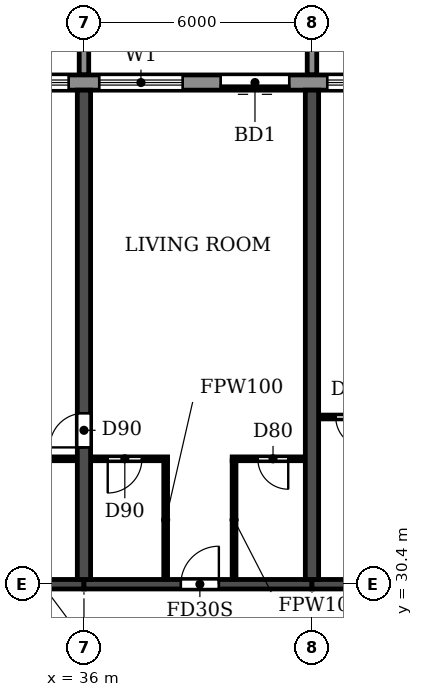
"""IFC4 building model, lengths in metres.
Left out: names, types, materials, properties, quantities, classifications, styles, units other than length and angle.
Written with IfcOpenShell. Run it as: python <this file> out.ifc"""

import sys

from ifc_helpers import new_model, si_unit, direction, frame, frame_2d, origin, place, context, subcontext, project, spatial, polyline, rectangle, outline, extrude, source, transform, mapped, element, fill, save


model = new_model("IFC4")
c1 = context("Model", 3, precision=1e-05, world=origin(), true_north=direction((0.0, 1.0)))
c2 = subcontext(c1, "Body", "Model", "MODEL_VIEW")
j1 = project(units=[si_unit("LENGTHUNIT", "METRE"), si_unit("PLANEANGLEUNIT", "RADIAN")], contexts=[c1])
p1 = place(None, origin())
s1 = spatial("IfcSite", under=j1, at=p1, CompositionType="ELEMENT")
p2 = place(p1, origin())
s2 = spatial("IfcBuilding", under=s1, at=p2, CompositionType="ELEMENT")
p3 = place(p2, frame((0.0, 0.0, 102.6)))
s3 = spatial("IfcBuildingStorey", under=s2, at=p3, CompositionType="ELEMENT", Elevation=102.6)
p4 = place(p3, frame((36.0, 30.525, 0.0), z_axis=(0.0, 0.0, 1.0), x_axis=(0.0, 1.0, 0.0)))
e1 = element("IfcWall", 1, at=p4, inside=s3, PredefinedType="SHEAR", context=c2, shape_type="SweptSolid", body=[
    extrude(rectangle(XDim=12.875, YDim=0.35, at=frame_2d((6.438, 0.0))), origin(), (0.0, 0.0, 1.0), 3.0),
])
p5 = place(p4, frame((3.475, 0.0, 0.0)))
e2 = element("IfcOpeningElement", 2, at=p5, cuts=e1, PredefinedType="OPENING", context=c2, shape_type="SweptSolid", body=[
    extrude(rectangle(XDim=0.9, YDim=2.1, at=frame_2d((0.45, 1.05))), frame((0.0, 0.185, 0.0), z_axis=(0.0, -1.0, 0.0), x_axis=(1.0, 0.0, 0.0)), (0.0, 0.0, 1.0), 0.37),
])
p6 = place(p3, frame((42.0, 30.525, 0.0), z_axis=(0.0, 0.0, 1.0), x_axis=(0.0, 1.0, 0.0)))
e3 = element("IfcWall", 3, at=p6, inside=s3, PredefinedType="SHEAR", context=c2, shape_type="SweptSolid", body=[
    extrude(rectangle(XDim=12.875, YDim=0.35, at=frame_2d((6.438, 0.0))), origin(), (0.0, 0.0, 1.0), 3.0),
])
p7 = place(p3, frame((30.0, 30.4, 0.0), z_axis=(0.0, 0.0, 1.0), x_axis=(1.0, 0.0, 0.0)))
e4 = element("IfcWall", 4, at=p7, inside=s3, PredefinedType="SHEAR", context=c2, shape_type="SweptSolid", body=[
    extrude(rectangle(XDim=6.0, YDim=0.25, at=frame_2d((3.0, 0.0))), origin(), (0.0, 0.0, 1.0), 2.4),
])
p8 = place(p3, frame((36.0, 30.4, 0.0), z_axis=(0.0, 0.0, 1.0), x_axis=(1.0, 0.0, 0.0)))
e5 = element("IfcWall", 5, at=p8, inside=s3, PredefinedType="SHEAR", context=c2, shape_type="SweptSolid", body=[
    extrude(rectangle(XDim=6.0, YDim=0.25, at=frame_2d((3.0, 0.0))), origin(), (0.0, 0.0, 1.0), 2.4),
])
p9 = place(p8, frame((2.55, 0.0, 0.0)))
e6 = element("IfcOpeningElement", 6, at=p9, cuts=e5, PredefinedType="OPENING", context=c2, shape_type="SweptSolid", body=[
    extrude(rectangle(XDim=1.0, YDim=2.1, at=frame_2d((0.5, 1.05))), frame((0.0, 0.135, 0.0), z_axis=(0.0, -1.0, 0.0), x_axis=(1.0, 0.0, 0.0)), (0.0, 0.0, 1.0), 0.27),
])
p10 = place(p3, frame((42.0, 30.4, 0.0), z_axis=(0.0, 0.0, 1.0), x_axis=(1.0, 0.0, 0.0)))
e7 = element("IfcWall", 7, at=p10, inside=s3, PredefinedType="SHEAR", context=c2, shape_type="SweptSolid", body=[
    extrude(rectangle(XDim=6.0, YDim=0.25, at=frame_2d((3.0, 0.0))), origin(), (0.0, 0.0, 1.0), 2.4),
])
p11 = place(p10, frame((2.45, 0.0, 0.0)))
e8 = element("IfcOpeningElement", 8, at=p11, cuts=e7, PredefinedType="OPENING", context=c2, shape_type="SweptSolid", body=[
    extrude(rectangle(XDim=1.0, YDim=2.1, at=frame_2d((0.5, 1.05))), frame((0.0, 0.135, 0.0), z_axis=(0.0, -1.0, 0.0), x_axis=(1.0, 0.0, 0.0)), (0.0, 0.0, 1.0), 0.27),
])
p12 = place(p3, frame((91.317, 43.6, 0.0), z_axis=(0.0, 0.0, 1.0), x_axis=(-1.0, 0.0, 0.0)))
e9 = element("IfcWall", 9, at=p12, inside=s3, PredefinedType="STANDARD", context=c2, shape_type="SweptSolid", body=[
    extrude(rectangle(XDim=80.634, YDim=0.4, at=frame_2d((40.317, 0.0))), origin(), (0.0, 0.0, 1.0), 3.0),
])
p13 = place(p12, frame((76.717, 0.0, 0.9)))
e10 = element("IfcOpeningElement", 10, at=p13, cuts=e9, PredefinedType="OPENING", context=c2, shape_type="SweptSolid", body=[
    extrude(rectangle(XDim=2.2, YDim=1.5, at=frame_2d((1.1, 0.75))), frame((0.0, 0.21, 0.0), z_axis=(0.0, -1.0, 0.0), x_axis=(1.0, 0.0, 0.0)), (0.0, 0.0, 1.0), 0.42),
])
p14 = place(p12, frame((73.917, 0.0, 0.0)))
e11 = element("IfcOpeningElement", 11, at=p14, cuts=e9, PredefinedType="OPENING", context=c2, shape_type="SweptSolid", body=[
    extrude(rectangle(XDim=1.8, YDim=2.4, at=frame_2d((0.9, 1.2))), frame((0.0, 0.21, 0.0), z_axis=(0.0, -1.0, 0.0), x_axis=(1.0, 0.0, 0.0)), (0.0, 0.0, 1.0), 0.42),
])
p15 = place(p12, frame((70.717, 0.0, 0.9)))
e12 = element("IfcOpeningElement", 12, at=p15, cuts=e9, PredefinedType="OPENING", context=c2, shape_type="SweptSolid", body=[
    extrude(rectangle(XDim=2.2, YDim=1.5, at=frame_2d((1.1, 0.75))), frame((0.0, 0.21, 0.0), z_axis=(0.0, -1.0, 0.0), x_axis=(1.0, 0.0, 0.0)), (0.0, 0.0, 1.0), 0.42),
])
p16 = place(p12, frame((67.717, 0.0, 0.9)))
e13 = element("IfcOpeningElement", 13, at=p16, cuts=e9, PredefinedType="OPENING", context=c2, shape_type="SweptSolid", body=[
    extrude(rectangle(XDim=2.2, YDim=1.5, at=frame_2d((1.1, 0.75))), frame((0.0, 0.21, 0.0), z_axis=(0.0, -1.0, 0.0), x_axis=(1.0, 0.0, 0.0)), (0.0, 0.0, 1.0), 0.42),
])
p17 = place(p12, frame((64.917, 0.0, 0.0)))
e14 = element("IfcOpeningElement", 14, at=p17, cuts=e9, PredefinedType="OPENING", context=c2, shape_type="SweptSolid", body=[
    extrude(rectangle(XDim=1.8, YDim=2.4, at=frame_2d((0.9, 1.2))), frame((0.0, 0.21, 0.0), z_axis=(0.0, -1.0, 0.0), x_axis=(1.0, 0.0, 0.0)), (0.0, 0.0, 1.0), 0.42),
])
p18 = place(p12, frame((61.717, 0.0, 0.9)))
e15 = element("IfcOpeningElement", 15, at=p18, cuts=e9, PredefinedType="OPENING", context=c2, shape_type="SweptSolid", body=[
    extrude(rectangle(XDim=2.2, YDim=1.5, at=frame_2d((1.1, 0.75))), frame((0.0, 0.21, 0.0), z_axis=(0.0, -1.0, 0.0), x_axis=(1.0, 0.0, 0.0)), (0.0, 0.0, 1.0), 0.42),
])
p19 = place(p12, frame((58.717, 0.0, 0.9)))
e16 = element("IfcOpeningElement", 16, at=p19, cuts=e9, PredefinedType="OPENING", context=c2, shape_type="SweptSolid", body=[
    extrude(rectangle(XDim=2.2, YDim=1.5, at=frame_2d((1.1, 0.75))), frame((0.0, 0.21, 0.0), z_axis=(0.0, -1.0, 0.0), x_axis=(1.0, 0.0, 0.0)), (0.0, 0.0, 1.0), 0.42),
])
p20 = place(p12, frame((55.717, 0.0, 0.9)))
e17 = element("IfcOpeningElement", 17, at=p20, cuts=e9, PredefinedType="OPENING", context=c2, shape_type="SweptSolid", body=[
    extrude(rectangle(XDim=2.2, YDim=1.5, at=frame_2d((1.1, 0.75))), frame((0.0, 0.21, 0.0), z_axis=(0.0, -1.0, 0.0), x_axis=(1.0, 0.0, 0.0)), (0.0, 0.0, 1.0), 0.42),
])
p21 = place(p12, frame((52.717, 0.0, 0.9)))
e18 = element("IfcOpeningElement", 18, at=p21, cuts=e9, PredefinedType="OPENING", context=c2, shape_type="SweptSolid", body=[
    extrude(rectangle(XDim=2.2, YDim=1.5, at=frame_2d((1.1, 0.75))), frame((0.0, 0.21, 0.0), z_axis=(0.0, -1.0, 0.0), x_axis=(1.0, 0.0, 0.0)), (0.0, 0.0, 1.0), 0.42),
])
p22 = place(p12, frame((49.917, 0.0, 0.0)))
e19 = element("IfcOpeningElement", 19, at=p22, cuts=e9, PredefinedType="OPENING", context=c2, shape_type="SweptSolid", body=[
    extrude(rectangle(XDim=1.8, YDim=2.4, at=frame_2d((0.9, 1.2))), frame((0.0, 0.21, 0.0), z_axis=(0.0, -1.0, 0.0), x_axis=(1.0, 0.0, 0.0)), (0.0, 0.0, 1.0), 0.42),
])
p23 = place(p12, frame((46.717, 0.0, 0.9)))
e20 = element("IfcOpeningElement", 20, at=p23, cuts=e9, PredefinedType="OPENING", context=c2, shape_type="SweptSolid", body=[
    extrude(rectangle(XDim=2.2, YDim=1.5, at=frame_2d((1.1, 0.75))), frame((0.0, 0.21, 0.0), z_axis=(0.0, -1.0, 0.0), x_axis=(1.0, 0.0, 0.0)), (0.0, 0.0, 1.0), 0.42),
])
p24 = place(p12, frame((43.917, 0.0, 0.0)))
e21 = element("IfcOpeningElement", 21, at=p24, cuts=e9, PredefinedType="OPENING", context=c2, shape_type="SweptSolid", body=[
    extrude(rectangle(XDim=1.8, YDim=2.4, at=frame_2d((0.9, 1.2))), frame((0.0, 0.21, 0.0), z_axis=(0.0, -1.0, 0.0), x_axis=(1.0, 0.0, 0.0)), (0.0, 0.0, 1.0), 0.42),
])
p25 = place(p12, frame((40.717, 0.0, 0.9)))
e22 = element("IfcOpeningElement", 22, at=p25, cuts=e9, PredefinedType="OPENING", context=c2, shape_type="SweptSolid", body=[
    extrude(rectangle(XDim=2.2, YDim=1.5, at=frame_2d((1.1, 0.75))), frame((0.0, 0.21, 0.0), z_axis=(0.0, -1.0, 0.0), x_axis=(1.0, 0.0, 0.0)), (0.0, 0.0, 1.0), 0.42),
])
p26 = place(p12, frame((37.717, 0.0, 0.9)))
e23 = element("IfcOpeningElement", 23, at=p26, cuts=e9, PredefinedType="OPENING", context=c2, shape_type="SweptSolid", body=[
    extrude(rectangle(XDim=2.2, YDim=1.5, at=frame_2d((1.1, 0.75))), frame((0.0, 0.21, 0.0), z_axis=(0.0, -1.0, 0.0), x_axis=(1.0, 0.0, 0.0)), (0.0, 0.0, 1.0), 0.42),
])
p27 = place(p12, frame((34.917, 0.0, 0.0)))
e24 = element("IfcOpeningElement", 24, at=p27, cuts=e9, PredefinedType="OPENING", context=c2, shape_type="SweptSolid", body=[
    extrude(rectangle(XDim=1.8, YDim=2.4, at=frame_2d((0.9, 1.2))), frame((0.0, 0.21, 0.0), z_axis=(0.0, -1.0, 0.0), x_axis=(1.0, 0.0, 0.0)), (0.0, 0.0, 1.0), 0.42),
])
p28 = place(p12, frame((31.717, 0.0, 0.9)))
e25 = element("IfcOpeningElement", 25, at=p28, cuts=e9, PredefinedType="OPENING", context=c2, shape_type="SweptSolid", body=[
    extrude(rectangle(XDim=2.2, YDim=1.5, at=frame_2d((1.1, 0.75))), frame((0.0, 0.21, 0.0), z_axis=(0.0, -1.0, 0.0), x_axis=(1.0, 0.0, 0.0)), (0.0, 0.0, 1.0), 0.42),
])
p29 = place(p12, frame((28.717, 0.0, 0.9)))
e26 = element("IfcOpeningElement", 26, at=p29, cuts=e9, PredefinedType="OPENING", context=c2, shape_type="SweptSolid", body=[
    extrude(rectangle(XDim=2.2, YDim=1.5, at=frame_2d((1.1, 0.75))), frame((0.0, 0.21, 0.0), z_axis=(0.0, -1.0, 0.0), x_axis=(1.0, 0.0, 0.0)), (0.0, 0.0, 1.0), 0.42),
])
p30 = place(p12, frame((25.917, 0.0, 0.0)))
e27 = element("IfcOpeningElement", 27, at=p30, cuts=e9, PredefinedType="OPENING", context=c2, shape_type="SweptSolid", body=[
    extrude(rectangle(XDim=1.8, YDim=2.4, at=frame_2d((0.9, 1.2))), frame((0.0, 0.21, 0.0), z_axis=(0.0, -1.0, 0.0), x_axis=(1.0, 0.0, 0.0)), (0.0, 0.0, 1.0), 0.42),
])
p31 = place(p12, frame((22.717, 0.0, 0.9)))
e28 = element("IfcOpeningElement", 28, at=p31, cuts=e9, PredefinedType="OPENING", context=c2, shape_type="SweptSolid", body=[
    extrude(rectangle(XDim=2.2, YDim=1.5, at=frame_2d((1.1, 0.75))), frame((0.0, 0.21, 0.0), z_axis=(0.0, -1.0, 0.0), x_axis=(1.0, 0.0, 0.0)), (0.0, 0.0, 1.0), 0.42),
])
p32 = place(p12, frame((19.717, 0.0, 0.9)))
e29 = element("IfcOpeningElement", 29, at=p32, cuts=e9, PredefinedType="OPENING", context=c2, shape_type="SweptSolid", body=[
    extrude(rectangle(XDim=2.2, YDim=1.5, at=frame_2d((1.1, 0.75))), frame((0.0, 0.21, 0.0), z_axis=(0.0, -1.0, 0.0), x_axis=(1.0, 0.0, 0.0)), (0.0, 0.0, 1.0), 0.42),
])
p33 = place(p12, frame((16.917, 0.0, 0.0)))
e30 = element("IfcOpeningElement", 30, at=p33, cuts=e9, PredefinedType="OPENING", context=c2, shape_type="SweptSolid", body=[
    extrude(rectangle(XDim=1.8, YDim=2.4, at=frame_2d((0.9, 1.2))), frame((0.0, 0.21, 0.0), z_axis=(0.0, -1.0, 0.0), x_axis=(1.0, 0.0, 0.0)), (0.0, 0.0, 1.0), 0.42),
])
p34 = place(p12, frame((13.717, 0.0, 0.9)))
e31 = element("IfcOpeningElement", 31, at=p34, cuts=e9, PredefinedType="OPENING", context=c2, shape_type="SweptSolid", body=[
    extrude(rectangle(XDim=2.2, YDim=1.5, at=frame_2d((1.1, 0.75))), frame((0.0, 0.21, 0.0), z_axis=(0.0, -1.0, 0.0), x_axis=(1.0, 0.0, 0.0)), (0.0, 0.0, 1.0), 0.42),
])
p35 = place(p12, frame((10.917, 0.0, 0.0)))
e32 = element("IfcOpeningElement", 32, at=p35, cuts=e9, PredefinedType="OPENING", context=c2, shape_type="SweptSolid", body=[
    extrude(rectangle(XDim=1.8, YDim=2.4, at=frame_2d((0.9, 1.2))), frame((0.0, 0.21, 0.0), z_axis=(0.0, -1.0, 0.0), x_axis=(1.0, 0.0, 0.0)), (0.0, 0.0, 1.0), 0.42),
])
p36 = place(p12, frame((7.717, 0.0, 0.9)))
e33 = element("IfcOpeningElement", 33, at=p36, cuts=e9, PredefinedType="OPENING", context=c2, shape_type="SweptSolid", body=[
    extrude(rectangle(XDim=2.2, YDim=1.5, at=frame_2d((1.1, 0.75))), frame((0.0, 0.21, 0.0), z_axis=(0.0, -1.0, 0.0), x_axis=(1.0, 0.0, 0.0)), (0.0, 0.0, 1.0), 0.42),
])
p37 = place(p12, frame((4.717, 0.0, 0.9)))
e34 = element("IfcOpeningElement", 34, at=p37, cuts=e9, PredefinedType="OPENING", context=c2, shape_type="SweptSolid", body=[
    extrude(rectangle(XDim=2.2, YDim=1.5, at=frame_2d((1.1, 0.75))), frame((0.0, 0.21, 0.0), z_axis=(0.0, -1.0, 0.0), x_axis=(1.0, 0.0, 0.0)), (0.0, 0.0, 1.0), 0.42),
])
p38 = place(p12, frame((1.917, 0.0, 0.0)))
e35 = element("IfcOpeningElement", 35, at=p38, cuts=e9, PredefinedType="OPENING", context=c2, shape_type="SweptSolid", body=[
    extrude(rectangle(XDim=1.8, YDim=2.4, at=frame_2d((0.9, 1.2))), frame((0.0, 0.21, 0.0), z_axis=(0.0, -1.0, 0.0), x_axis=(1.0, 0.0, 0.0)), (0.0, 0.0, 1.0), 0.42),
])
m1 = source(origin(), c2, "Body", "SweptSolid", [
    extrude(outline(polyline([(0.0, 0.0), (0.25, 0.0), (0.25, 3.1), (0.0, 3.1), (0.0, 0.0)])), origin(), (0.0, 0.0, 1.0), 3.1),
])
for number, where in (
    (36, (35.875, 43.8, 0.0)),
    (37, (41.875, 43.8, 0.0)),
):
    element("IfcWall", number, at=place(p3, frame(where)), inside=s3, PredefinedType="STANDARD", context=c2, shape_type="MappedRepresentation", body=[
        mapped(m1, transform((0.0, 0.0, 0.0))),
    ])
p39 = place(p3, frame((32.9, 33.7, 0.0), z_axis=(0.0, 0.0, 1.0), x_axis=(1.0, 0.0, 0.0)))
e38 = element("IfcWall", 38, at=p39, inside=s3, PredefinedType="PARTITIONING", context=c2, shape_type="SweptSolid", body=[
    extrude(rectangle(XDim=2.915, YDim=0.1, at=frame_2d((1.458, 0.0))), origin(), (0.0, 0.0, 1.0), 3.0),
])
p40 = place(p39, frame((1.2, 0.0, 0.0)))
e39 = element("IfcOpeningElement", 39, at=p40, cuts=e38, PredefinedType="OPENING", context=c2, shape_type="SweptSolid", body=[
    extrude(rectangle(XDim=0.8, YDim=2.1, at=frame_2d((0.4, 1.05))), frame((0.0, 0.06, 0.0), z_axis=(0.0, -1.0, 0.0), x_axis=(1.0, 0.0, 0.0)), (0.0, 0.0, 1.0), 0.12),
])
p41 = place(p3, frame((36.185, 33.7, 0.0), z_axis=(0.0, 0.0, 1.0), x_axis=(1.0, 0.0, 0.0)))
e40 = element("IfcWall", 40, at=p41, inside=s3, PredefinedType="PARTITIONING", context=c2, shape_type="SweptSolid", body=[
    extrude(rectangle(XDim=2.015, YDim=0.1, at=frame_2d((1.007, 0.0))), origin(), (0.0, 0.0, 1.0), 3.0),
])
p42 = place(p41, frame((0.44, 0.0, 0.0)))
e41 = element("IfcOpeningElement", 41, at=p42, cuts=e40, PredefinedType="OPENING", context=c2, shape_type="SweptSolid", body=[
    extrude(rectangle(XDim=0.9, YDim=2.1, at=frame_2d((0.45, 1.05))), frame((0.0, 0.06, 0.0), z_axis=(0.0, -1.0, 0.0), x_axis=(1.0, 0.0, 0.0)), (0.0, 0.0, 1.0), 0.12),
])
p43 = place(p3, frame((39.9, 33.7, 0.0), z_axis=(0.0, 0.0, 1.0), x_axis=(1.0, 0.0, 0.0)))
e42 = element("IfcWall", 42, at=p43, inside=s3, PredefinedType="PARTITIONING", context=c2, shape_type="SweptSolid", body=[
    extrude(rectangle(XDim=1.915, YDim=0.1, at=frame_2d((0.958, 0.0))), origin(), (0.0, 0.0, 1.0), 3.0),
])
p44 = place(p43, frame((0.675, 0.0, 0.0)))
e43 = element("IfcOpeningElement", 43, at=p44, cuts=e42, PredefinedType="OPENING", context=c2, shape_type="SweptSolid", body=[
    extrude(rectangle(XDim=0.8, YDim=2.1, at=frame_2d((0.4, 1.05))), frame((0.0, 0.06, 0.0), z_axis=(0.0, -1.0, 0.0), x_axis=(1.0, 0.0, 0.0)), (0.0, 0.0, 1.0), 0.12),
])
p45 = place(p3, frame((42.185, 34.8, 0.0), z_axis=(0.0, 0.0, 1.0), x_axis=(1.0, 0.0, 0.0)))
e44 = element("IfcWall", 44, at=p45, inside=s3, PredefinedType="PARTITIONING", context=c2, shape_type="SweptSolid", body=[
    extrude(rectangle(XDim=1.915, YDim=0.1, at=frame_2d((0.958, 0.0))), origin(), (0.0, 0.0, 1.0), 3.0),
])
p46 = place(p45, frame((0.44, 0.0, 0.0)))
e45 = element("IfcOpeningElement", 45, at=p46, cuts=e44, PredefinedType="OPENING", context=c2, shape_type="SweptSolid", body=[
    extrude(rectangle(XDim=0.8, YDim=2.1, at=frame_2d((0.4, 1.05))), frame((0.0, 0.06, 0.0), z_axis=(0.0, -1.0, 0.0), x_axis=(1.0, 0.0, 0.0)), (0.0, 0.0, 1.0), 0.12),
])
for number, where, z_axis, x_axis in (
    (46, (38.15, 30.535, 0.0), (0.0, 0.0, 1.0), (0.0, 1.0, 0.0)),
    (47, (39.95, 30.535, 0.0), (0.0, 0.0, 1.0), (0.0, 1.0, 0.0)),
):
    element("IfcWall", number, at=place(p3, frame(where, z_axis=z_axis, x_axis=x_axis)), inside=s3, PredefinedType="PARTITIONING", context=c2, shape_type="SweptSolid", body=[
        extrude(rectangle(XDim=3.115, YDim=0.1, at=frame_2d((1.558, 0.0))), origin(), (0.0, 0.0, 1.0), 3.0),
    ])
p47 = place(p20, origin())
e48 = element("IfcWindow", 48, at=p47, inside=s3, PartitioningType="DOUBLE_PANEL_HORIZONTAL", PredefinedType="WINDOW", context=c2, shape_type="SweptSolid", body=[
    extrude(rectangle(XDim=2.2, YDim=1.5, at=frame_2d((1.1, 0.75))), frame((0.0, 0.03, 0.0), z_axis=(0.0, -1.0, 0.0), x_axis=(1.0, 0.0, 0.0)), (0.0, 0.0, 1.0), 0.06),
])
fill(e17, e48)
p48 = place(p21, origin())
e49 = element("IfcWindow", 49, at=p48, inside=s3, PartitioningType="DOUBLE_PANEL_HORIZONTAL", PredefinedType="WINDOW", context=c2, shape_type="SweptSolid", body=[
    extrude(rectangle(XDim=2.2, YDim=1.5, at=frame_2d((1.1, 0.75))), frame((0.0, 0.03, 0.0), z_axis=(0.0, -1.0, 0.0), x_axis=(1.0, 0.0, 0.0)), (0.0, 0.0, 1.0), 0.06),
])
fill(e18, e49)
p49 = place(p22, origin())
e50 = element("IfcDoor", 50, at=p49, inside=s3, OperationType="DOUBLE_DOOR_SLIDING", PredefinedType="DOOR", context=c2, shape_type="SweptSolid", body=[
    extrude(rectangle(XDim=1.8, YDim=2.4, at=frame_2d((0.9, 1.2))), frame((0.0, 0.025, 0.0), z_axis=(0.0, -1.0, 0.0), x_axis=(1.0, 0.0, 0.0)), (0.0, 0.0, 1.0), 0.05),
])
fill(e19, e50)
p50 = place(p23, origin())
e51 = element("IfcWindow", 51, at=p50, inside=s3, PartitioningType="DOUBLE_PANEL_HORIZONTAL", PredefinedType="WINDOW", context=c2, shape_type="SweptSolid", body=[
    extrude(rectangle(XDim=2.2, YDim=1.5, at=frame_2d((1.1, 0.75))), frame((0.0, 0.03, 0.0), z_axis=(0.0, -1.0, 0.0), x_axis=(1.0, 0.0, 0.0)), (0.0, 0.0, 1.0), 0.06),
])
fill(e20, e51)
p51 = place(p5, origin())
e52 = element("IfcDoor", 52, at=p51, inside=s3, OperationType="SINGLE_SWING_LEFT", PredefinedType="DOOR", context=c2, shape_type="SweptSolid", body=[
    extrude(rectangle(XDim=0.9, YDim=2.1, at=frame_2d((0.45, 1.05))), frame((0.0, 0.025, 0.0), z_axis=(0.0, -1.0, 0.0), x_axis=(1.0, 0.0, 0.0)), (0.0, 0.0, 1.0), 0.05),
])
fill(e2, e52)
p52 = place(p42, frame((0.9, 0.0, 0.0), z_axis=(0.0, 0.0, 1.0), x_axis=(-1.0, 0.0, 0.0)))
e53 = element("IfcDoor", 53, at=p52, inside=s3, OperationType="SINGLE_SWING_RIGHT", PredefinedType="DOOR", context=c2, shape_type="SweptSolid", body=[
    extrude(rectangle(XDim=0.9, YDim=2.1, at=frame_2d((0.45, 1.05))), frame((0.0, 0.025, 0.0), z_axis=(0.0, -1.0, 0.0), x_axis=(1.0, 0.0, 0.0)), (0.0, 0.0, 1.0), 0.05),
])
fill(e41, e53)
p53 = place(p9, origin())
e54 = element("IfcDoor", 54, at=p53, inside=s3, OperationType="SINGLE_SWING_RIGHT", PredefinedType="DOOR", context=c2, shape_type="SweptSolid", body=[
    extrude(rectangle(XDim=1.0, YDim=2.1, at=frame_2d((0.5, 1.05))), frame((0.0, 0.025, 0.0), z_axis=(0.0, -1.0, 0.0), x_axis=(1.0, 0.0, 0.0)), (0.0, 0.0, 1.0), 0.05),
])
fill(e6, e54)
p54 = place(p44, frame((0.8, 0.0, 0.0), z_axis=(0.0, 0.0, 1.0), x_axis=(-1.0, 0.0, 0.0)))
e55 = element("IfcDoor", 55, at=p54, inside=s3, OperationType="SINGLE_SWING_LEFT", PredefinedType="DOOR", context=c2, shape_type="SweptSolid", body=[
    extrude(rectangle(XDim=0.8, YDim=2.1, at=frame_2d((0.4, 1.05))), frame((0.0, 0.025, 0.0), z_axis=(0.0, -1.0, 0.0), x_axis=(1.0, 0.0, 0.0)), (0.0, 0.0, 1.0), 0.05),
])
fill(e43, e55)
p55 = place(p46, frame((0.8, 0.0, 0.0), z_axis=(0.0, 0.0, 1.0), x_axis=(-1.0, 0.0, 0.0)))
e56 = element("IfcDoor", 56, at=p55, inside=s3, OperationType="SINGLE_SWING_LEFT", PredefinedType="DOOR", context=c2, shape_type="SweptSolid", body=[
    extrude(rectangle(XDim=0.8, YDim=2.1, at=frame_2d((0.4, 1.05))), frame((0.0, 0.025, 0.0), z_axis=(0.0, -1.0, 0.0), x_axis=(1.0, 0.0, 0.0)), (0.0, 0.0, 1.0), 0.05),
])
fill(e45, e56)
save(model, sys.argv[1])
